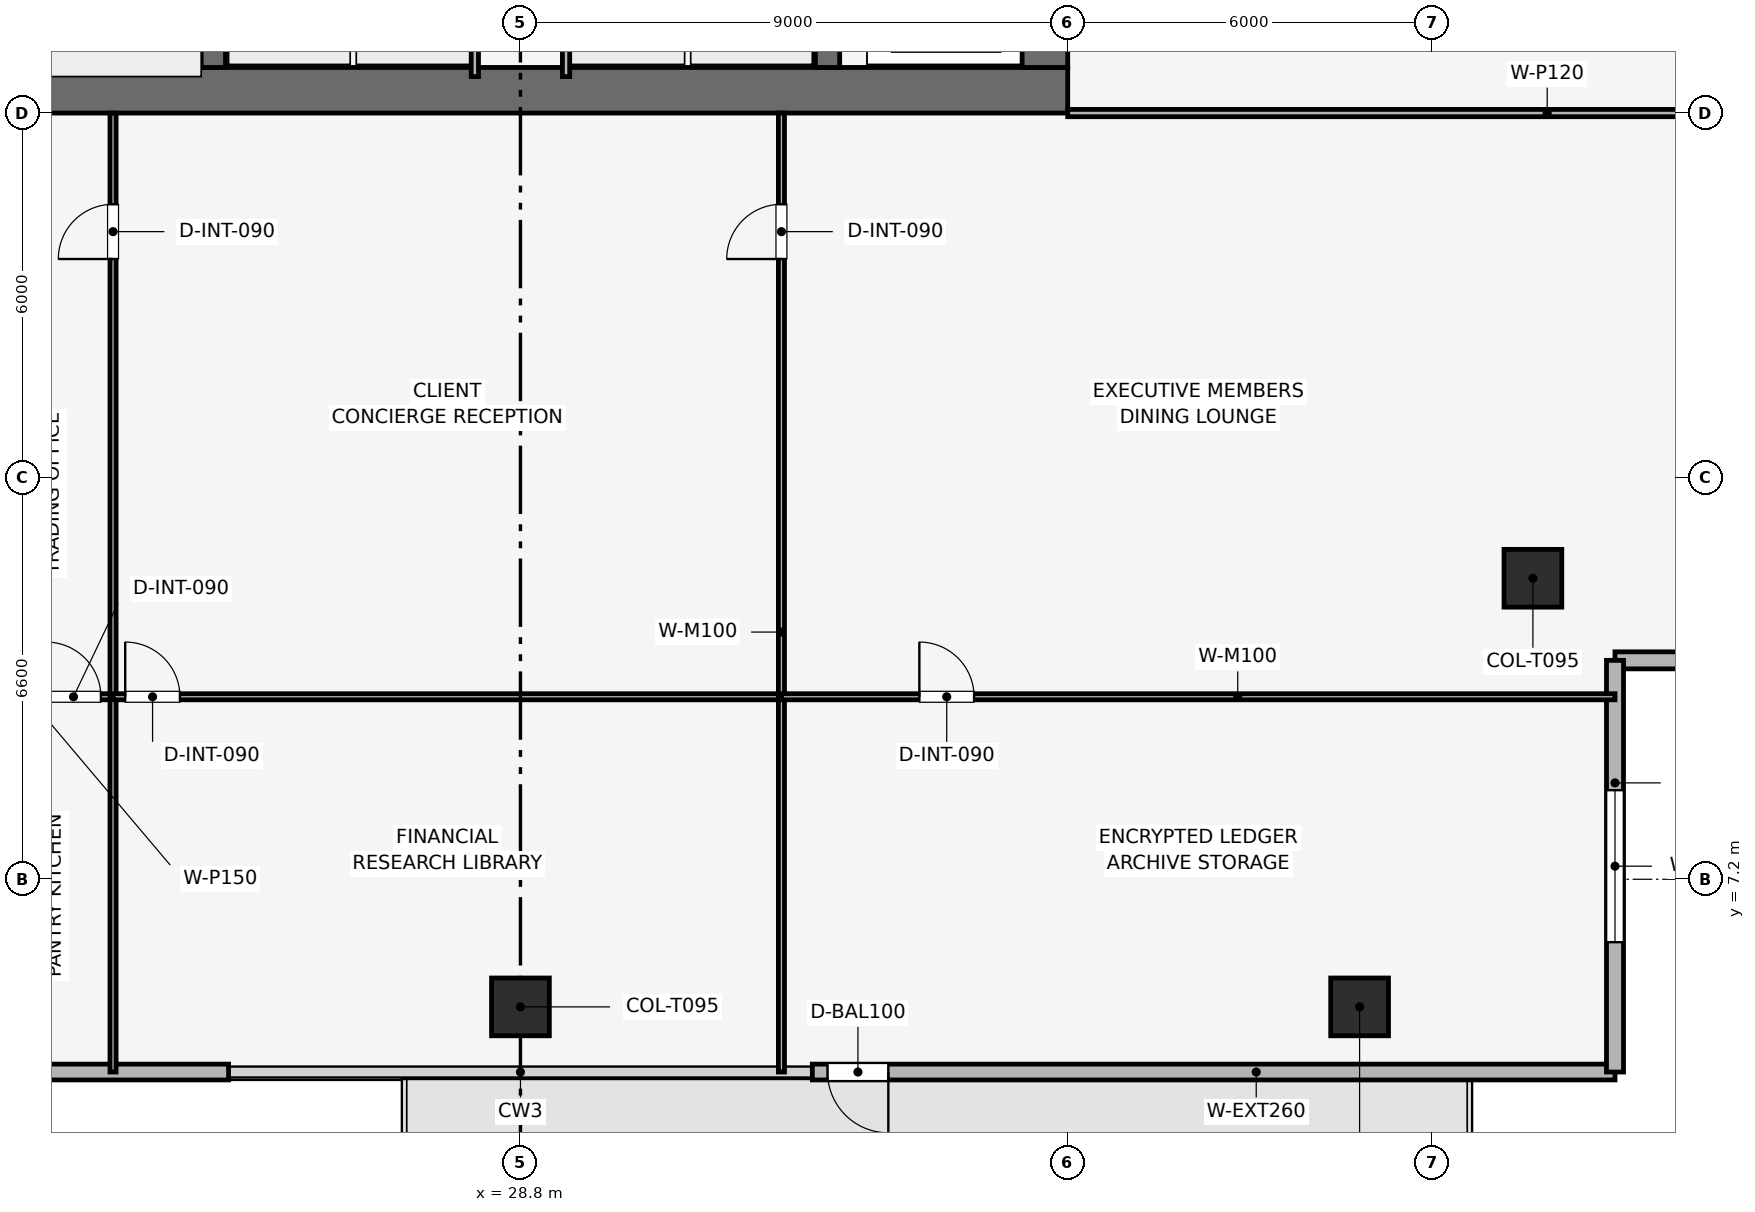
"""IFC4 building model, lengths in metres.
Left out: names, types, materials, properties, quantities, classifications, styles, units other than length and angle.
Written with IfcOpenShell. Run it as: python <this file> out.ifc"""

import sys

from ifc_helpers import new_model, si_unit, direction, frame, frame_2d, origin, origin_2d, place, context, subcontext, project, spatial, rectangle, extrude, element, fill, save


model = new_model("IFC4")
c1 = context("Model", 3, precision=1e-05, world=origin(), true_north=direction((0.0, 1.0)))
c2 = subcontext(c1, "Body", "Model", "MODEL_VIEW")
j1 = project(units=[si_unit("LENGTHUNIT", "METRE"), si_unit("PLANEANGLEUNIT", "RADIAN")], contexts=[c1])
p1 = place(None, origin())
s1 = spatial("IfcSite", under=j1, at=p1, CompositionType="ELEMENT")
p2 = place(p1, origin())
s2 = spatial("IfcBuilding", under=s1, at=p2, CompositionType="ELEMENT")
p3 = place(p2, frame((0.0, 0.0, 280.35)))
s3 = spatial("IfcBuildingStorey", under=s2, at=p3, CompositionType="ELEMENT", Elevation=280.35)
p4 = place(p3, frame((19.8, 20.175, 0.0), z_axis=(0.0, 0.0, 1.0), x_axis=(1.0, 0.0, 0.0)))
e1 = element("IfcWall", 1, at=p4, inside=s3, PredefinedType="SHEAR", context=c2, shape_type="SweptSolid", body=[
    extrude(rectangle(XDim=18.0, YDim=0.75, at=frame_2d((9.0, 0.0))), origin(), (0.0, 0.0, 1.0), 3.75),
])
p5 = place(p3, frame((37.425, 20.55, 0.0), z_axis=(0.0, 0.0, 1.0), x_axis=(0.0, 1.0, 0.0)))
e2 = element("IfcWall", 2, at=p5, inside=s3, PredefinedType="SHEAR", context=c2, shape_type="SweptSolid", body=[
    extrude(rectangle(XDim=16.5, YDim=0.75, at=frame_2d((8.25, 0.0))), origin(), (0.0, 0.0, 1.0), 3.75),
])
p6 = place(p5, frame((4.75, 0.0, 0.0)))
e3 = element("IfcOpeningElement", 3, at=p6, cuts=e2, PredefinedType="OPENING", context=c2, shape_type="SweptSolid", body=[
    extrude(rectangle(XDim=1.1, YDim=2.15, at=frame_2d((0.55, 1.075))), frame((0.0, 0.385, 0.0), z_axis=(0.0, -1.0, 0.0), x_axis=(1.0, 0.0, 0.0)), (0.0, 0.0, 1.0), 0.77),
])
for number, where, z_axis, x_axis in (
    (4, (23.75, 20.55, 0.0), (0.0, 0.0, 1.0), (0.0, 1.0, 0.0)),
    (5, (33.85, 20.55, 0.0), (0.0, 0.0, 1.0), (0.0, 1.0, 0.0)),
):
    element("IfcWall", number, at=place(p3, frame(where, z_axis=z_axis, x_axis=x_axis)), inside=s3, PredefinedType="SHEAR", context=c2, shape_type="SweptSolid", body=[
        extrude(rectangle(XDim=16.5, YDim=0.4, at=frame_2d((8.25, 0.0))), origin(), (0.0, 0.0, 1.0), 3.75),
    ])
for number, where, z_axis, x_axis in (
    (6, (28.8, 5.101, 0.003), (0.0, 0.233, 0.972), (-1.0, 0.0, 0.0)),
    (7, (42.6, 5.101, 0.003), (0.0, 0.233, 0.972), (-1.0, 0.0, 0.0)),
):
    element("IfcColumn", number, at=place(p3, frame(where, z_axis=z_axis, x_axis=x_axis)), inside=s3, PredefinedType="COLUMN", context=c2, shape_type="SweptSolid", body=[
        extrude(rectangle(XDim=0.95, YDim=0.95, at=origin_2d()), origin(), (0.0, 0.0, 1.0), 3.48),
    ])
p7 = place(p3, frame((45.45, 12.15, 0.003), z_axis=(-0.156204794595, 0.156204794595, 0.975294890939), x_axis=(-0.707106781187, -0.707106781187, 0.0)))
e8 = element("IfcColumn", 8, at=p7, inside=s3, PredefinedType="COLUMN", context=c2, shape_type="SweptSolid", body=[
    extrude(rectangle(XDim=0.95, YDim=0.95, at=origin_2d()), origin(), (0.0, 0.0, 1.0), 3.47),
])
p8 = place(p3, frame((46.8, 4.03, 0.0), z_axis=(0.0, 0.0, 1.0), x_axis=(-1.0, 0.0, 0.0)))
e9 = element("IfcWall", 9, at=p8, inside=s3, PredefinedType="SOLIDWALL", context=c2, shape_type="SweptSolid", body=[
    extrude(rectangle(XDim=13.2, YDim=0.26, at=frame_2d((6.6, 0.0))), origin(), (0.0, 0.0, 1.0), 3.39),
])
p9 = place(p8, frame((11.95, 0.0, 0.0)))
e10 = element("IfcOpeningElement", 10, at=p9, cuts=e9, PredefinedType="OPENING", context=c2, shape_type="SweptSolid", body=[
    extrude(rectangle(XDim=1.0, YDim=2.2, at=frame_2d((0.5, 1.1))), frame((0.0, 0.14, 0.0), z_axis=(0.0, -1.0, 0.0), x_axis=(1.0, 0.0, 0.0)), (0.0, 0.0, 1.0), 0.28),
])
p10 = place(p3, frame((24.0, 4.03, 0.0), z_axis=(0.0, 0.0, 1.0), x_axis=(-1.0, 0.0, 0.0)))
e11 = element("IfcWall", 11, at=p10, inside=s3, PredefinedType="SOLIDWALL", context=c2, shape_type="SweptSolid", body=[
    extrude(rectangle(XDim=13.2, YDim=0.26, at=frame_2d((6.6, 0.0))), origin(), (0.0, 0.0, 1.0), 3.39),
])
p11 = place(p10, frame((11.75, 0.0, 0.72)))
e12 = element("IfcOpeningElement", 12, at=p11, cuts=e11, PredefinedType="OPENING", context=c2, shape_type="SweptSolid", body=[
    extrude(rectangle(XDim=1.2, YDim=2.1, at=frame_2d((0.6, 1.05))), frame((0.0, 0.14, 0.0), z_axis=(0.0, -1.0, 0.0), x_axis=(1.0, 0.0, 0.0)), (0.0, 0.0, 1.0), 0.28),
])
p12 = place(p3, frame((53.57, 10.8, 0.0), z_axis=(0.0, 0.0, 1.0), x_axis=(-1.0, 0.0, 0.0)))
e13 = element("IfcWall", 13, at=p12, inside=s3, PredefinedType="SOLIDWALL", context=c2, shape_type="SweptSolid", body=[
    extrude(rectangle(XDim=6.77, YDim=0.28, at=frame_2d((3.385, 0.0))), origin(), (0.0, 0.0, 1.0), 3.39),
])
p13 = place(p12, frame((2.135, 0.0, 0.72)))
e14 = element("IfcOpeningElement", 14, at=p13, cuts=e13, PredefinedType="OPENING", context=c2, shape_type="SweptSolid", body=[
    extrude(rectangle(XDim=2.5, YDim=1.9, at=frame_2d((1.25, 0.95))), frame((0.0, 0.15, 0.0), z_axis=(0.0, -1.0, 0.0), x_axis=(1.0, 0.0, 0.0)), (0.0, 0.0, 1.0), 0.3),
])
p14 = place(p3, frame((46.8, 10.8, 0.0), z_axis=(0.0, 0.0, 1.0), x_axis=(0.0, -1.0, 0.0)))
e15 = element("IfcWall", 15, at=p14, inside=s3, PredefinedType="SOLIDWALL", context=c2, shape_type="SweptSolid", body=[
    extrude(rectangle(XDim=6.77, YDim=0.28, at=frame_2d((3.385, 0.0))), origin(), (0.0, 0.0, 1.0), 3.39),
])
p15 = place(p14, frame((2.135, 0.0, 0.72)))
e16 = element("IfcOpeningElement", 16, at=p15, cuts=e15, PredefinedType="OPENING", context=c2, shape_type="SweptSolid", body=[
    extrude(rectangle(XDim=2.5, YDim=1.9, at=frame_2d((1.25, 0.95))), frame((0.0, 0.15, 0.0), z_axis=(0.0, -1.0, 0.0), x_axis=(1.0, 0.0, 0.0)), (0.0, 0.0, 1.0), 0.3),
])
for number, where, z_axis, x_axis in (
    (17, (28.05, 20.4, 0.0), (0.0, 0.0, 1.0), (0.0, 1.0, 0.0)),
    (18, (29.55, 20.4, 0.0), (0.0, 0.0, 1.0), (0.0, 1.0, 0.0)),
):
    element("IfcWall", number, at=place(p3, frame(where, z_axis=z_axis, x_axis=x_axis)), inside=s3, PredefinedType="PARTITIONING", context=c2, shape_type="SweptSolid", body=[
        extrude(rectangle(XDim=8.15, YDim=0.12, at=frame_2d((4.075, 0.0))), origin(), (0.0, 0.0, 1.0), 3.39),
    ])
p16 = place(p3, frame((19.8, 10.201, 0.0), z_axis=(0.0, 0.0, 1.0), x_axis=(1.0, 0.0, 0.0)))
e19 = element("IfcWall", 19, at=p16, inside=s3, PredefinedType="MOVABLE", context=c2, shape_type="SweptSolid", body=[
    extrude(rectangle(XDim=2.3, YDim=0.1, at=frame_2d((1.15, 0.0))), origin(), (0.0, 0.0, 1.0), 2.975),
])
p17 = place(p16, frame((1.2, 0.0, 0.0)))
e20 = element("IfcOpeningElement", 20, at=p17, cuts=e19, PredefinedType="OPENING", context=c2, shape_type="SweptSolid", body=[
    extrude(rectangle(XDim=0.9, YDim=2.1, at=frame_2d((0.45, 1.05))), frame((0.0, 0.06, 0.0), z_axis=(0.0, -1.0, 0.0), x_axis=(1.0, 0.0, 0.0)), (0.0, 0.0, 1.0), 0.12),
])
p18 = place(p3, frame((22.1, 4.03, 0.0), z_axis=(0.0, 0.0, 1.0), x_axis=(0.0, 1.0, 0.0)))
e21 = element("IfcWall", 21, at=p18, inside=s3, PredefinedType="MOVABLE", context=c2, shape_type="SweptSolid", body=[
    extrude(rectangle(XDim=15.77, YDim=0.1, at=frame_2d((7.885, 0.0))), origin(), (0.0, 0.0, 1.0), 2.975),
])
p19 = place(p18, frame((13.37, 0.0, 0.0)))
e22 = element("IfcOpeningElement", 22, at=p19, cuts=e21, PredefinedType="OPENING", context=c2, shape_type="SweptSolid", body=[
    extrude(rectangle(XDim=0.9, YDim=2.1, at=frame_2d((0.45, 1.05))), frame((0.0, 0.06, 0.0), z_axis=(0.0, -1.0, 0.0), x_axis=(1.0, 0.0, 0.0)), (0.0, 0.0, 1.0), 0.12),
])
p20 = place(p3, frame((22.1, 10.201, 0.0), z_axis=(0.0, 0.0, 1.0), x_axis=(1.0, 0.0, 0.0)))
e23 = element("IfcWall", 23, at=p20, inside=s3, PredefinedType="MOVABLE", context=c2, shape_type="SweptSolid", body=[
    extrude(rectangle(XDim=10.992, YDim=0.1, at=frame_2d((5.496, 0.0))), origin(), (0.0, 0.0, 1.0), 2.975),
])
p21 = place(p20, frame((0.2, 0.0, 0.0)))
e24 = element("IfcOpeningElement", 24, at=p21, cuts=e23, PredefinedType="OPENING", context=c2, shape_type="SweptSolid", body=[
    extrude(rectangle(XDim=0.9, YDim=2.1, at=frame_2d((0.45, 1.05))), frame((0.0, 0.06, 0.0), z_axis=(0.0, -1.0, 0.0), x_axis=(1.0, 0.0, 0.0)), (0.0, 0.0, 1.0), 0.12),
])
p22 = place(p3, frame((33.092, 4.03, 0.0), z_axis=(0.0, 0.0, 1.0), x_axis=(0.0, 1.0, 0.0)))
e25 = element("IfcWall", 25, at=p22, inside=s3, PredefinedType="MOVABLE", context=c2, shape_type="SweptSolid", body=[
    extrude(rectangle(XDim=15.77, YDim=0.1, at=frame_2d((7.885, 0.0))), origin(), (0.0, 0.0, 1.0), 2.975),
])
p23 = place(p22, frame((13.37, 0.0, 0.0)))
e26 = element("IfcOpeningElement", 26, at=p23, cuts=e25, PredefinedType="OPENING", context=c2, shape_type="SweptSolid", body=[
    extrude(rectangle(XDim=0.9, YDim=2.1, at=frame_2d((0.45, 1.05))), frame((0.0, 0.06, 0.0), z_axis=(0.0, -1.0, 0.0), x_axis=(1.0, 0.0, 0.0)), (0.0, 0.0, 1.0), 0.12),
])
p24 = place(p3, frame((33.092, 10.201, 0.0), z_axis=(0.0, 0.0, 1.0), x_axis=(1.0, 0.0, 0.0)))
e27 = element("IfcWall", 27, at=p24, inside=s3, PredefinedType="MOVABLE", context=c2, shape_type="SweptSolid", body=[
    extrude(rectangle(XDim=13.708, YDim=0.1, at=frame_2d((6.854, 0.0))), origin(), (0.0, 0.0, 1.0), 2.975),
])
p25 = place(p24, frame((2.268, 0.0, 0.0)))
e28 = element("IfcOpeningElement", 28, at=p25, cuts=e27, PredefinedType="OPENING", context=c2, shape_type="SweptSolid", body=[
    extrude(rectangle(XDim=0.9, YDim=2.1, at=frame_2d((0.45, 1.05))), frame((0.0, 0.06, 0.0), z_axis=(0.0, -1.0, 0.0), x_axis=(1.0, 0.0, 0.0)), (0.0, 0.0, 1.0), 0.12),
])
p26 = place(p3, frame((37.8, 19.8, 0.0), z_axis=(0.0, 0.0, 1.0), x_axis=(1.0, 0.0, 0.0)))
e29 = element("IfcWall", 29, at=p26, inside=s3, PredefinedType="PARTITIONING", context=c2, shape_type="SweptSolid", body=[
    extrude(rectangle(XDim=15.77, YDim=0.12, at=frame_2d((7.885, 0.0))), origin(), (0.0, 0.0, 1.0), 2.975),
])
p27 = place(p9, origin())
e30 = element("IfcDoor", 30, at=p27, inside=s3, OperationType="SINGLE_SWING_LEFT", PredefinedType="DOOR", context=c2, shape_type="SweptSolid", body=[
    extrude(rectangle(XDim=1.0, YDim=2.2, at=frame_2d((0.5, 1.1))), frame((0.0, 0.025, 0.0), z_axis=(0.0, -1.0, 0.0), x_axis=(1.0, 0.0, 0.0)), (0.0, 0.0, 1.0), 0.05),
])
fill(e10, e30)
p28 = place(p15, origin())
e31 = element("IfcWindow", 31, at=p28, inside=s3, PartitioningType="SINGLE_PANEL", PredefinedType="WINDOW", context=c2, shape_type="SweptSolid", body=[
    extrude(rectangle(XDim=2.5, YDim=1.9, at=frame_2d((1.25, 0.95))), frame((0.0, 0.03, 0.0), z_axis=(0.0, -1.0, 0.0), x_axis=(1.0, 0.0, 0.0)), (0.0, 0.0, 1.0), 0.06),
])
fill(e16, e31)
p29 = place(p17, origin())
e32 = element("IfcDoor", 32, at=p29, inside=s3, OperationType="SINGLE_SWING_LEFT", PredefinedType="DOOR", context=c2, shape_type="SweptSolid", body=[
    extrude(rectangle(XDim=0.9, YDim=2.1, at=frame_2d((0.45, 1.05))), frame((0.0, 0.025, 0.0), z_axis=(0.0, -1.0, 0.0), x_axis=(1.0, 0.0, 0.0)), (0.0, 0.0, 1.0), 0.05),
])
fill(e20, e32)
p30 = place(p19, origin())
e33 = element("IfcDoor", 33, at=p30, inside=s3, OperationType="SINGLE_SWING_LEFT", PredefinedType="DOOR", context=c2, shape_type="SweptSolid", body=[
    extrude(rectangle(XDim=0.9, YDim=2.1, at=frame_2d((0.45, 1.05))), frame((0.0, 0.025, 0.0), z_axis=(0.0, -1.0, 0.0), x_axis=(1.0, 0.0, 0.0)), (0.0, 0.0, 1.0), 0.05),
])
fill(e22, e33)
p31 = place(p21, origin())
e34 = element("IfcDoor", 34, at=p31, inside=s3, OperationType="SINGLE_SWING_LEFT", PredefinedType="DOOR", context=c2, shape_type="SweptSolid", body=[
    extrude(rectangle(XDim=0.9, YDim=2.1, at=frame_2d((0.45, 1.05))), frame((0.0, 0.025, 0.0), z_axis=(0.0, -1.0, 0.0), x_axis=(1.0, 0.0, 0.0)), (0.0, 0.0, 1.0), 0.05),
])
fill(e24, e34)
p32 = place(p23, origin())
e35 = element("IfcDoor", 35, at=p32, inside=s3, OperationType="SINGLE_SWING_LEFT", PredefinedType="DOOR", context=c2, shape_type="SweptSolid", body=[
    extrude(rectangle(XDim=0.9, YDim=2.1, at=frame_2d((0.45, 1.05))), frame((0.0, 0.025, 0.0), z_axis=(0.0, -1.0, 0.0), x_axis=(1.0, 0.0, 0.0)), (0.0, 0.0, 1.0), 0.05),
])
fill(e26, e35)
p33 = place(p25, origin())
e36 = element("IfcDoor", 36, at=p33, inside=s3, OperationType="SINGLE_SWING_LEFT", PredefinedType="DOOR", context=c2, shape_type="SweptSolid", body=[
    extrude(rectangle(XDim=0.9, YDim=2.1, at=frame_2d((0.45, 1.05))), frame((0.0, 0.025, 0.0), z_axis=(0.0, -1.0, 0.0), x_axis=(1.0, 0.0, 0.0)), (0.0, 0.0, 1.0), 0.05),
])
fill(e28, e36)
save(model, sys.argv[1])
